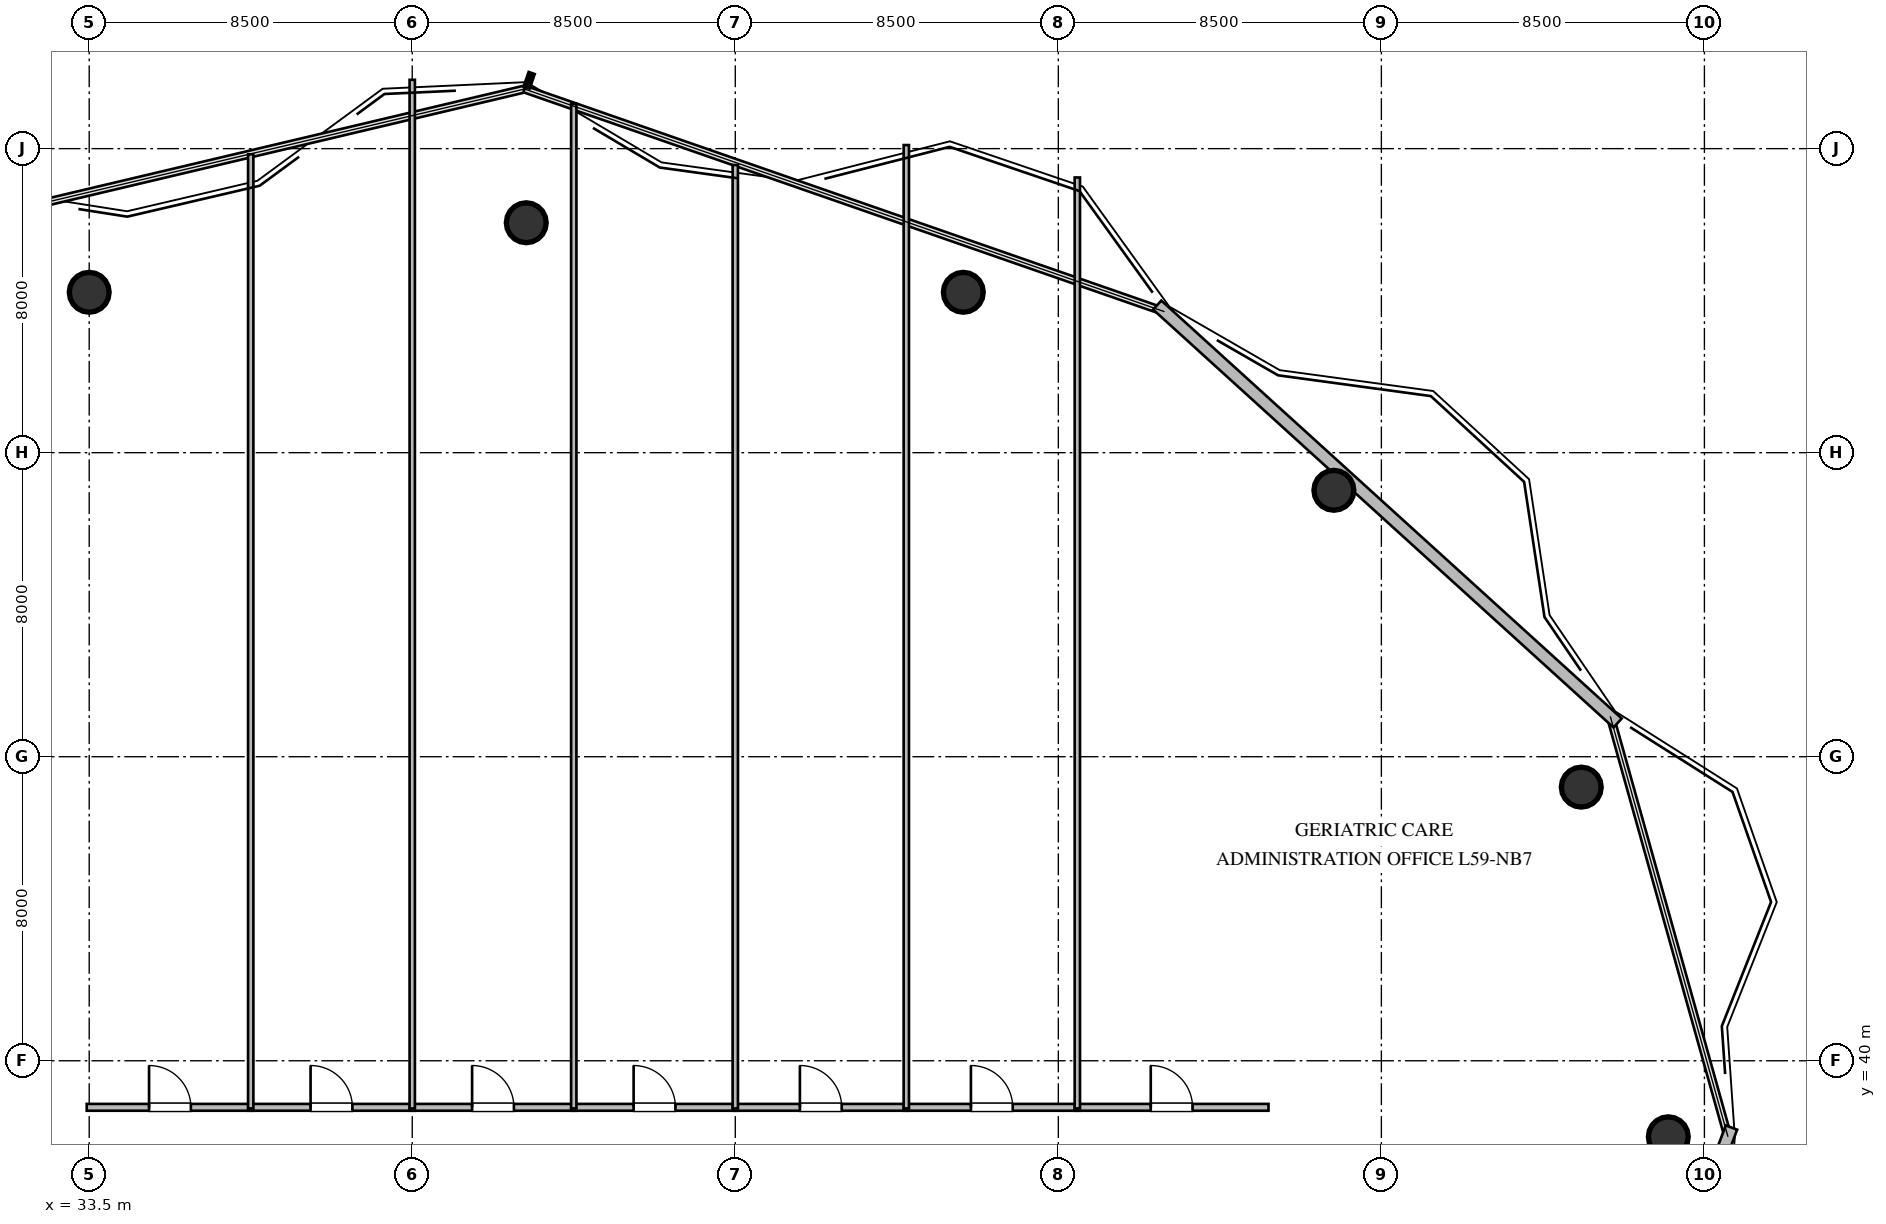
"""IFC4 building model, lengths in metres.
Left out: names, types, materials, properties, quantities, classifications, styles, units other than length and angle.
Written with IfcOpenShell. Run it as: python <this file> out.ifc"""

import sys

from ifc_helpers import new_model, si_unit, direction, frame, frame_2d, origin, origin_2d, place, context, subcontext, project, spatial, rectangle, circle, extrude, element, fill, save


model = new_model("IFC4")
c1 = context("Model", 3, precision=1e-05, world=origin(), true_north=direction((0.0, 1.0)))
c2 = subcontext(c1, "Body", "Model", "MODEL_VIEW")
j1 = project(units=[si_unit("LENGTHUNIT", "METRE"), si_unit("PLANEANGLEUNIT", "RADIAN")], contexts=[c1])
p1 = place(None, origin())
s1 = spatial("IfcSite", under=j1, at=p1, CompositionType="ELEMENT")
p2 = place(p1, origin())
s2 = spatial("IfcBuilding", under=s1, at=p2, CompositionType="ELEMENT")
p3 = place(p2, frame((0.0, 0.0, 224.4)))
s3 = spatial("IfcBuildingStorey", under=s2, at=p3, CompositionType="ELEMENT", Elevation=224.4)
for number, where, z_axis, x_axis in (
    (1, (75.05, 38.0, 0.0), (0.0, 0.0, 1.0), (1.0, 0.0, 0.0)),
    (2, (72.76, 47.2, 0.0), (0.0, 0.0, 1.0), (1.0, 0.0, 0.0)),
    (3, (66.25, 55.01, 0.0), (0.0, 0.0, 1.0), (1.0, 0.0, 0.0)),
    (4, (56.5, 60.22, 0.0), (0.0, 0.0, 1.0), (1.0, 0.0, 0.0)),
    (5, (45.0, 62.05, 0.0), (0.0, 0.0, 1.0), (1.0, 0.0, 0.0)),
    (6, (33.5, 60.22, 0.0), (0.0, 0.0, 1.0), (1.0, 0.0, 0.0)),
):
    element("IfcColumn", number, at=place(p3, frame(where, z_axis=z_axis, x_axis=x_axis)), inside=s3, PredefinedType="COLUMN", context=c2, shape_type="SweptSolid", body=[
        extrude(circle(Radius=0.525, at=origin_2d()), origin(), (0.0, 0.0, 1.0), 3.6),
    ])
p4 = place(p3, frame((76.712, 38.243, 0.0), z_axis=(0.0, 0.0, 1.0), x_axis=(-0.353659523244, -0.935374225441, 0.0)))
e7 = element("IfcWall", 7, at=p4, inside=s3, PredefinedType="STANDARD", context=c2, shape_type="SweptSolid", body=[
    extrude(rectangle(XDim=14.172, YDim=0.32, at=frame_2d((7.086, 0.0))), origin(), (0.0, 0.0, 1.0), 3.36),
])
p5 = place(p3, frame((61.602, 59.884, 0.0), z_axis=(0.0, 0.0, 1.0), x_axis=(0.740416582554, -0.672148260638, 0.0)))
e8 = element("IfcWall", 8, at=p5, inside=s3, PredefinedType="STANDARD", context=c2, shape_type="SweptSolid", body=[
    extrude(rectangle(XDim=16.361, YDim=0.32, at=frame_2d((8.181, 0.0))), origin(), (0.0, 0.0, 1.0), 3.36),
])
p6 = place(p3, frame((33.435, 38.775, 0.0), z_axis=(0.0, 0.0, 1.0), x_axis=(1.0, 0.0, 0.0)))
e9 = element("IfcWall", 9, at=p6, inside=s3, PredefinedType="PARTITIONING", context=c2, shape_type="SweptSolid", body=[
    extrude(rectangle(XDim=4.38, YDim=0.18, at=frame_2d((2.19, 0.0))), origin(), (0.0, 0.0, 1.0), 3.36),
])
p7 = place(p6, frame((1.64, 0.0, 0.0)))
e10 = element("IfcOpeningElement", 10, at=p7, cuts=e9, PredefinedType="OPENING", context=c2, shape_type="SweptSolid", body=[
    extrude(rectangle(XDim=1.1, YDim=2.1, at=frame_2d((0.55, 1.05))), frame((0.0, 0.1, 0.0), z_axis=(0.0, -1.0, 0.0), x_axis=(1.0, 0.0, 0.0)), (0.0, 0.0, 1.0), 0.2),
])
p8 = place(p3, frame((37.685, 38.775, 0.0), z_axis=(0.0, 0.0, 1.0), x_axis=(1.0, 0.0, 0.0)))
e11 = element("IfcWall", 11, at=p8, inside=s3, PredefinedType="PARTITIONING", context=c2, shape_type="SweptSolid", body=[
    extrude(rectangle(XDim=4.38, YDim=0.18, at=frame_2d((2.19, 0.0))), origin(), (0.0, 0.0, 1.0), 3.36),
])
p9 = place(p8, frame((1.64, 0.0, 0.0)))
e12 = element("IfcOpeningElement", 12, at=p9, cuts=e11, PredefinedType="OPENING", context=c2, shape_type="SweptSolid", body=[
    extrude(rectangle(XDim=1.1, YDim=2.1, at=frame_2d((0.55, 1.05))), frame((0.0, 0.1, 0.0), z_axis=(0.0, -1.0, 0.0), x_axis=(1.0, 0.0, 0.0)), (0.0, 0.0, 1.0), 0.2),
])
p10 = place(p3, frame((41.935, 38.775, 0.0), z_axis=(0.0, 0.0, 1.0), x_axis=(1.0, 0.0, 0.0)))
e13 = element("IfcWall", 13, at=p10, inside=s3, PredefinedType="PARTITIONING", context=c2, shape_type="SweptSolid", body=[
    extrude(rectangle(XDim=4.38, YDim=0.18, at=frame_2d((2.19, 0.0))), origin(), (0.0, 0.0, 1.0), 3.36),
])
p11 = place(p10, frame((1.64, 0.0, 0.0)))
e14 = element("IfcOpeningElement", 14, at=p11, cuts=e13, PredefinedType="OPENING", context=c2, shape_type="SweptSolid", body=[
    extrude(rectangle(XDim=1.1, YDim=2.1, at=frame_2d((0.55, 1.05))), frame((0.0, 0.1, 0.0), z_axis=(0.0, -1.0, 0.0), x_axis=(1.0, 0.0, 0.0)), (0.0, 0.0, 1.0), 0.2),
])
p12 = place(p3, frame((46.185, 38.775, 0.0), z_axis=(0.0, 0.0, 1.0), x_axis=(1.0, 0.0, 0.0)))
e15 = element("IfcWall", 15, at=p12, inside=s3, PredefinedType="PARTITIONING", context=c2, shape_type="SweptSolid", body=[
    extrude(rectangle(XDim=4.38, YDim=0.18, at=frame_2d((2.19, 0.0))), origin(), (0.0, 0.0, 1.0), 3.36),
])
p13 = place(p12, frame((1.64, 0.0, 0.0)))
e16 = element("IfcOpeningElement", 16, at=p13, cuts=e15, PredefinedType="OPENING", context=c2, shape_type="SweptSolid", body=[
    extrude(rectangle(XDim=1.1, YDim=2.1, at=frame_2d((0.55, 1.05))), frame((0.0, 0.1, 0.0), z_axis=(0.0, -1.0, 0.0), x_axis=(1.0, 0.0, 0.0)), (0.0, 0.0, 1.0), 0.2),
])
p14 = place(p3, frame((50.435, 38.775, 0.0), z_axis=(0.0, 0.0, 1.0), x_axis=(1.0, 0.0, 0.0)))
e17 = element("IfcWall", 17, at=p14, inside=s3, PredefinedType="PARTITIONING", context=c2, shape_type="SweptSolid", body=[
    extrude(rectangle(XDim=4.63, YDim=0.18, at=frame_2d((2.315, 0.0))), origin(), (0.0, 0.0, 1.0), 3.36),
])
p15 = place(p14, frame((1.765, 0.0, 0.0)))
e18 = element("IfcOpeningElement", 18, at=p15, cuts=e17, PredefinedType="OPENING", context=c2, shape_type="SweptSolid", body=[
    extrude(rectangle(XDim=1.1, YDim=2.1, at=frame_2d((0.55, 1.05))), frame((0.0, 0.1, 0.0), z_axis=(0.0, -1.0, 0.0), x_axis=(1.0, 0.0, 0.0)), (0.0, 0.0, 1.0), 0.2),
])
p16 = place(p3, frame((54.935, 38.775, 0.0), z_axis=(0.0, 0.0, 1.0), x_axis=(1.0, 0.0, 0.0)))
e19 = element("IfcWall", 19, at=p16, inside=s3, PredefinedType="PARTITIONING", context=c2, shape_type="SweptSolid", body=[
    extrude(rectangle(XDim=4.63, YDim=0.18, at=frame_2d((2.315, 0.0))), origin(), (0.0, 0.0, 1.0), 3.36),
])
p17 = place(p16, frame((1.765, 0.0, 0.0)))
e20 = element("IfcOpeningElement", 20, at=p17, cuts=e19, PredefinedType="OPENING", context=c2, shape_type="SweptSolid", body=[
    extrude(rectangle(XDim=1.1, YDim=2.1, at=frame_2d((0.55, 1.05))), frame((0.0, 0.1, 0.0), z_axis=(0.0, -1.0, 0.0), x_axis=(1.0, 0.0, 0.0)), (0.0, 0.0, 1.0), 0.2),
])
p18 = place(p3, frame((59.435, 38.775, 0.0), z_axis=(0.0, 0.0, 1.0), x_axis=(1.0, 0.0, 0.0)))
e21 = element("IfcWall", 21, at=p18, inside=s3, PredefinedType="PARTITIONING", context=c2, shape_type="SweptSolid", body=[
    extrude(rectangle(XDim=5.095, YDim=0.18, at=frame_2d((2.547, 0.0))), origin(), (0.0, 0.0, 1.0), 3.36),
])
p19 = place(p18, frame((1.997, 0.0, 0.0)))
e22 = element("IfcOpeningElement", 22, at=p19, cuts=e21, PredefinedType="OPENING", context=c2, shape_type="SweptSolid", body=[
    extrude(rectangle(XDim=1.1, YDim=2.1, at=frame_2d((0.55, 1.05))), frame((0.0, 0.1, 0.0), z_axis=(0.0, -1.0, 0.0), x_axis=(1.0, 0.0, 0.0)), (0.0, 0.0, 1.0), 0.2),
])
p20 = place(p3, frame((37.75, 63.852, 0.0), z_axis=(0.0, 0.0, 1.0), x_axis=(0.0, -1.0, 0.0)))
e23 = element("IfcWall", 23, at=p20, inside=s3, PredefinedType="PARTITIONING", context=c2, shape_type="SweptSolid", body=[
    extrude(rectangle(XDim=25.107, YDim=0.14, at=frame_2d((12.553, 0.0))), origin(), (0.0, 0.0, 1.0), 3.36),
])
p21 = place(p3, frame((42.0, 65.811, 0.0), z_axis=(0.0, 0.0, 1.0), x_axis=(0.0, -1.0, 0.0)))
e24 = element("IfcWall", 24, at=p21, inside=s3, PredefinedType="PARTITIONING", context=c2, shape_type="SweptSolid", body=[
    extrude(rectangle(XDim=27.066, YDim=0.14, at=frame_2d((13.533, 0.0))), origin(), (0.0, 0.0, 1.0), 3.36),
])
p22 = place(p3, frame((46.25, 65.179, 0.0), z_axis=(0.0, 0.0, 1.0), x_axis=(0.0, -1.0, 0.0)))
e25 = element("IfcWall", 25, at=p22, inside=s3, PredefinedType="PARTITIONING", context=c2, shape_type="SweptSolid", body=[
    extrude(rectangle(XDim=26.434, YDim=0.14, at=frame_2d((13.217, 0.0))), origin(), (0.0, 0.0, 1.0), 3.36),
])
p23 = place(p3, frame((50.5, 63.569, 0.0), z_axis=(0.0, 0.0, 1.0), x_axis=(0.0, -1.0, 0.0)))
e26 = element("IfcWall", 26, at=p23, inside=s3, PredefinedType="PARTITIONING", context=c2, shape_type="SweptSolid", body=[
    extrude(rectangle(XDim=24.824, YDim=0.14, at=frame_2d((12.412, 0.0))), origin(), (0.0, 0.0, 1.0), 3.36),
])
p24 = place(p3, frame((55.0, 64.094, 0.0), z_axis=(0.0, 0.0, 1.0), x_axis=(0.0, -1.0, 0.0)))
e27 = element("IfcWall", 27, at=p24, inside=s3, PredefinedType="PARTITIONING", context=c2, shape_type="SweptSolid", body=[
    extrude(rectangle(XDim=25.349, YDim=0.14, at=frame_2d((12.674, 0.0))), origin(), (0.0, 0.0, 1.0), 3.36),
])
p25 = place(p3, frame((59.5, 63.241, 0.0), z_axis=(0.0, 0.0, 1.0), x_axis=(0.0, -1.0, 0.0)))
e28 = element("IfcWall", 28, at=p25, inside=s3, PredefinedType="PARTITIONING", context=c2, shape_type="SweptSolid", body=[
    extrude(rectangle(XDim=24.496, YDim=0.14, at=frame_2d((12.248, 0.0))), origin(), (0.0, 0.0, 1.0), 2.996),
])
p26 = place(p7, origin())
e29 = element("IfcDoor", 29, at=p26, inside=s3, OperationType="SINGLE_SWING_LEFT", PredefinedType="DOOR", context=c2, shape_type="SweptSolid", body=[
    extrude(rectangle(XDim=1.1, YDim=2.1, at=frame_2d((0.55, 1.05))), frame((0.0, 0.025, 0.0), z_axis=(0.0, -1.0, 0.0), x_axis=(1.0, 0.0, 0.0)), (0.0, 0.0, 1.0), 0.05),
])
fill(e10, e29)
p27 = place(p9, origin())
e30 = element("IfcDoor", 30, at=p27, inside=s3, OperationType="SINGLE_SWING_LEFT", PredefinedType="DOOR", context=c2, shape_type="SweptSolid", body=[
    extrude(rectangle(XDim=1.1, YDim=2.1, at=frame_2d((0.55, 1.05))), frame((0.0, 0.025, 0.0), z_axis=(0.0, -1.0, 0.0), x_axis=(1.0, 0.0, 0.0)), (0.0, 0.0, 1.0), 0.05),
])
fill(e12, e30)
p28 = place(p11, origin())
e31 = element("IfcDoor", 31, at=p28, inside=s3, OperationType="SINGLE_SWING_LEFT", PredefinedType="DOOR", context=c2, shape_type="SweptSolid", body=[
    extrude(rectangle(XDim=1.1, YDim=2.1, at=frame_2d((0.55, 1.05))), frame((0.0, 0.025, 0.0), z_axis=(0.0, -1.0, 0.0), x_axis=(1.0, 0.0, 0.0)), (0.0, 0.0, 1.0), 0.05),
])
fill(e14, e31)
p29 = place(p13, origin())
e32 = element("IfcDoor", 32, at=p29, inside=s3, OperationType="SINGLE_SWING_LEFT", PredefinedType="DOOR", context=c2, shape_type="SweptSolid", body=[
    extrude(rectangle(XDim=1.1, YDim=2.1, at=frame_2d((0.55, 1.05))), frame((0.0, 0.025, 0.0), z_axis=(0.0, -1.0, 0.0), x_axis=(1.0, 0.0, 0.0)), (0.0, 0.0, 1.0), 0.05),
])
fill(e16, e32)
p30 = place(p15, origin())
e33 = element("IfcDoor", 33, at=p30, inside=s3, OperationType="SINGLE_SWING_LEFT", PredefinedType="DOOR", context=c2, shape_type="SweptSolid", body=[
    extrude(rectangle(XDim=1.1, YDim=2.1, at=frame_2d((0.55, 1.05))), frame((0.0, 0.025, 0.0), z_axis=(0.0, -1.0, 0.0), x_axis=(1.0, 0.0, 0.0)), (0.0, 0.0, 1.0), 0.05),
])
fill(e18, e33)
p31 = place(p17, origin())
e34 = element("IfcDoor", 34, at=p31, inside=s3, OperationType="SINGLE_SWING_LEFT", PredefinedType="DOOR", context=c2, shape_type="SweptSolid", body=[
    extrude(rectangle(XDim=1.1, YDim=2.1, at=frame_2d((0.55, 1.05))), frame((0.0, 0.025, 0.0), z_axis=(0.0, -1.0, 0.0), x_axis=(1.0, 0.0, 0.0)), (0.0, 0.0, 1.0), 0.05),
])
fill(e20, e34)
p32 = place(p19, origin())
e35 = element("IfcDoor", 35, at=p32, inside=s3, OperationType="SINGLE_SWING_LEFT", PredefinedType="DOOR", context=c2, shape_type="SweptSolid", body=[
    extrude(rectangle(XDim=1.1, YDim=2.1, at=frame_2d((0.55, 1.05))), frame((0.0, 0.025, 0.0), z_axis=(0.0, -1.0, 0.0), x_axis=(1.0, 0.0, 0.0)), (0.0, 0.0, 1.0), 0.05),
])
fill(e22, e35)
save(model, sys.argv[1])
